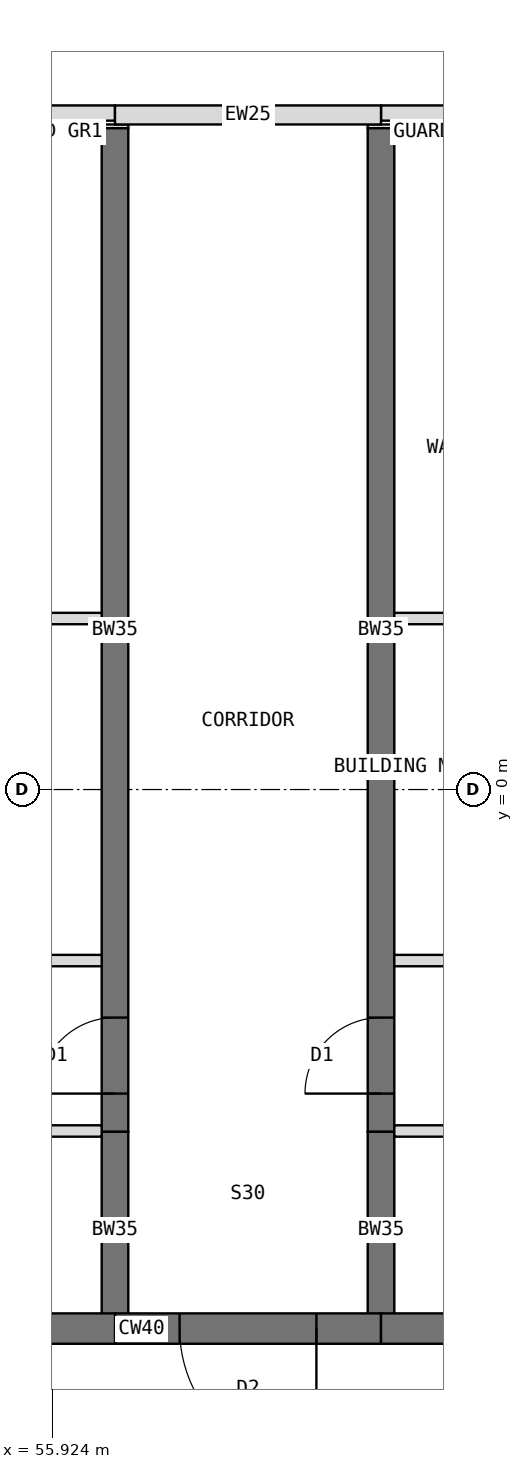
"""IFC4 building model, lengths in metres.
Left out: names, types, materials, properties, quantities, classifications, styles, units other than length and angle.
Written with IfcOpenShell. Run it as: python <this file> out.ifc"""

import sys

from ifc_helpers import new_model, si_unit, direction, frame, frame_2d, origin, place, context, subcontext, project, spatial, rectangle, extrude, element, fill, save


model = new_model("IFC4")
c1 = context("Model", 3, precision=1e-05, world=origin(), true_north=direction((0.0, 1.0)))
c2 = subcontext(c1, "Body", "Model", "MODEL_VIEW")
j1 = project(units=[si_unit("LENGTHUNIT", "METRE"), si_unit("PLANEANGLEUNIT", "RADIAN")], contexts=[c1])
p1 = place(None, origin())
s1 = spatial("IfcSite", under=j1, at=p1, CompositionType="ELEMENT")
p2 = place(p1, origin())
s2 = spatial("IfcBuilding", under=s1, at=p2, CompositionType="ELEMENT")
p3 = place(p2, frame((0.0, 0.0, 291.5)))
s3 = spatial("IfcBuildingStorey", under=s2, at=p3, CompositionType="ELEMENT", Elevation=291.5)
p4 = place(p3, frame((64.798, -7.092, 0.0), z_axis=(0.0, 0.0, 1.0), x_axis=(-1.0, 0.0, 0.0)))
e1 = element("IfcWall", 1, at=p4, inside=s3, PredefinedType="SHEAR", context=c2, shape_type="SweptSolid", body=[
    extrude(rectangle(XDim=4.548, YDim=0.4, at=frame_2d((2.274, 0.0))), origin(), (0.0, 0.0, 1.0), 4.55),
])
p5 = place(p3, frame((60.25, -7.092, 0.0), z_axis=(0.0, 0.0, 1.0), x_axis=(-1.0, 0.0, 0.0)))
e2 = element("IfcWall", 2, at=p5, inside=s3, PredefinedType="SHEAR", context=c2, shape_type="SweptSolid", body=[
    extrude(rectangle(XDim=3.5, YDim=0.4, at=frame_2d((1.75, 0.0))), origin(), (0.0, 0.0, 1.0), 4.55),
])
p6 = place(p5, frame((0.85, 0.0, 0.0)))
e3 = element("IfcOpeningElement", 3, at=p6, cuts=e2, PredefinedType="OPENING", context=c2, shape_type="SweptSolid", body=[
    extrude(rectangle(XDim=1.8, YDim=2.1, at=frame_2d((0.9, 1.05))), frame((0.0, 0.21, 0.0), z_axis=(0.0, -1.0, 0.0), x_axis=(1.0, 0.0, 0.0)), (0.0, 0.0, 1.0), 0.42),
])
p7 = place(p3, frame((56.75, -7.092, 0.0), z_axis=(0.0, 0.0, 1.0), x_axis=(-1.0, 0.0, 0.0)))
e4 = element("IfcWall", 4, at=p7, inside=s3, PredefinedType="SHEAR", context=c2, shape_type="SweptSolid", body=[
    extrude(rectangle(XDim=4.548, YDim=0.4, at=frame_2d((2.274, 0.0))), origin(), (0.0, 0.0, 1.0), 4.55),
])
p8 = place(p3, frame((56.75, -7.092, 0.0), z_axis=(0.0, 0.0, 1.0), x_axis=(0.0, 1.0, 0.0)))
e5 = element("IfcWall", 5, at=p8, inside=s3, PredefinedType="SHEAR", context=c2, shape_type="SweptSolid", body=[
    extrude(rectangle(XDim=2.592, YDim=0.35, at=frame_2d((1.296, 0.0))), origin(), (0.0, 0.0, 1.0), 4.55),
])
p9 = place(p3, frame((56.75, -4.5, 0.0), z_axis=(0.0, 0.0, 1.0), x_axis=(0.0, 1.0, 0.0)))
e6 = element("IfcWall", 6, at=p9, inside=s3, PredefinedType="SHEAR", context=c2, shape_type="SweptSolid", body=[
    extrude(rectangle(XDim=13.2, YDim=0.35, at=frame_2d((6.6, 0.0))), origin(), (0.0, 0.0, 1.0), 4.55),
])
p10 = place(p9, frame((0.5, 0.0, 0.0)))
e7 = element("IfcOpeningElement", 7, at=p10, cuts=e6, PredefinedType="OPENING", context=c2, shape_type="SweptSolid", body=[
    extrude(rectangle(XDim=1.0, YDim=2.1, at=frame_2d((0.5, 1.05))), frame((0.0, 0.185, 0.0), z_axis=(0.0, -1.0, 0.0), x_axis=(1.0, 0.0, 0.0)), (0.0, 0.0, 1.0), 0.37),
])
p11 = place(p3, frame((60.25, -7.092, 0.0), z_axis=(0.0, 0.0, 1.0), x_axis=(0.0, 1.0, 0.0)))
e8 = element("IfcWall", 8, at=p11, inside=s3, PredefinedType="SHEAR", context=c2, shape_type="SweptSolid", body=[
    extrude(rectangle(XDim=2.592, YDim=0.35, at=frame_2d((1.296, 0.0))), origin(), (0.0, 0.0, 1.0), 4.55),
])
p12 = place(p3, frame((60.25, -4.5, 0.0), z_axis=(0.0, 0.0, 1.0), x_axis=(0.0, 1.0, 0.0)))
e9 = element("IfcWall", 9, at=p12, inside=s3, PredefinedType="SHEAR", context=c2, shape_type="SweptSolid", body=[
    extrude(rectangle(XDim=13.2, YDim=0.35, at=frame_2d((6.6, 0.0))), origin(), (0.0, 0.0, 1.0), 4.55),
])
p13 = place(p12, frame((0.5, 0.0, 0.0)))
e10 = element("IfcOpeningElement", 10, at=p13, cuts=e9, PredefinedType="OPENING", context=c2, shape_type="SweptSolid", body=[
    extrude(rectangle(XDim=1.0, YDim=2.1, at=frame_2d((0.5, 1.05))), frame((0.0, 0.185, 0.0), z_axis=(0.0, -1.0, 0.0), x_axis=(1.0, 0.0, 0.0)), (0.0, 0.0, 1.0), 0.37),
])
p14 = place(p3, frame((63.0, 8.9, 0.0), z_axis=(0.0, 0.0, 1.0), x_axis=(-1.0, 0.0, 0.0)))
e11 = element("IfcWall", 11, at=p14, inside=s3, PredefinedType="USERDEFINED", context=c2, shape_type="SweptSolid", body=[
    extrude(rectangle(XDim=2.75, YDim=0.2, at=frame_2d((1.375, 0.0))), origin(), (0.0, 0.0, 1.0), 4.55),
])
p15 = place(p3, frame((60.25, 8.875, 0.0), z_axis=(0.0, 0.0, 1.0), x_axis=(-1.0, 0.0, 0.0)))
e12 = element("IfcWall", 12, at=p15, inside=s3, PredefinedType="STANDARD", context=c2, shape_type="SweptSolid", body=[
    extrude(rectangle(XDim=3.5, YDim=0.25, at=frame_2d((1.75, 0.0))), origin(), (0.0, 0.0, 1.0), 4.55),
])
p16 = place(p3, frame((56.75, 8.9, 0.0), z_axis=(0.0, 0.0, 1.0), x_axis=(-1.0, 0.0, 0.0)))
e13 = element("IfcWall", 13, at=p16, inside=s3, PredefinedType="USERDEFINED", context=c2, shape_type="SweptSolid", body=[
    extrude(rectangle(XDim=2.75, YDim=0.2, at=frame_2d((1.375, 0.0))), origin(), (0.0, 0.0, 1.0), 4.55),
])
for number, where, z_axis, x_axis in (
    (14, (56.75, 8.7, 0.0), (0.0, 0.0, 1.0), (0.0, 1.0, 0.0)),
    (15, (60.25, 8.7, 0.0), (0.0, 0.0, 1.0), (0.0, 1.0, 0.0)),
):
    element("IfcWall", number, at=place(p3, frame(where, z_axis=z_axis, x_axis=x_axis)), inside=s3, PredefinedType="PARTITIONING", context=c2, shape_type="SweptSolid", body=[
        extrude(rectangle(XDim=0.05, YDim=0.35, at=frame_2d((0.025, 0.0))), origin(), (0.0, 0.0, 1.0), 4.55),
    ])
p17 = place(p3, frame((56.575, -2.25, 0.0), z_axis=(0.0, 0.0, 1.0), x_axis=(-1.0, 0.0, 0.0)))
e16 = element("IfcWall", 16, at=p17, inside=s3, PredefinedType="PARTITIONING", context=c2, shape_type="SweptSolid", body=[
    extrude(rectangle(XDim=4.825, YDim=0.15, at=frame_2d((2.413, 0.0))), origin(), (0.0, 0.0, 1.0), 4.55),
])
p18 = place(p17, frame((3.425, 0.0, 0.0)))
e17 = element("IfcOpeningElement", 17, at=p18, cuts=e16, PredefinedType="OPENING", context=c2, shape_type="SweptSolid", body=[
    extrude(rectangle(XDim=1.0, YDim=2.1, at=frame_2d((0.5, 1.05))), frame((0.0, 0.085, 0.0), z_axis=(0.0, -1.0, 0.0), x_axis=(1.0, 0.0, 0.0)), (0.0, 0.0, 1.0), 0.17),
])
p19 = place(p3, frame((56.575, 2.25, 0.0), z_axis=(0.0, 0.0, 1.0), x_axis=(-1.0, 0.0, 0.0)))
e18 = element("IfcWall", 18, at=p19, inside=s3, PredefinedType="PARTITIONING", context=c2, shape_type="SweptSolid", body=[
    extrude(rectangle(XDim=4.825, YDim=0.15, at=frame_2d((2.413, 0.0))), origin(), (0.0, 0.0, 1.0), 4.55),
])
p20 = place(p19, frame((3.425, 0.0, 0.0)))
e19 = element("IfcOpeningElement", 19, at=p20, cuts=e18, PredefinedType="OPENING", context=c2, shape_type="SweptSolid", body=[
    extrude(rectangle(XDim=1.0, YDim=2.1, at=frame_2d((0.5, 1.05))), frame((0.0, 0.085, 0.0), z_axis=(0.0, -1.0, 0.0), x_axis=(1.0, 0.0, 0.0)), (0.0, 0.0, 1.0), 0.17),
])
p21 = place(p3, frame((56.575, -4.492, 0.0), z_axis=(0.0, 0.0, 1.0), x_axis=(-1.0, 0.0, 0.0)))
e20 = element("IfcWall", 20, at=p21, inside=s3, PredefinedType="PARTITIONING", context=c2, shape_type="SweptSolid", body=[
    extrude(rectangle(XDim=2.4, YDim=0.15, at=frame_2d((1.2, 0.0))), origin(), (0.0, 0.0, 1.0), 4.017),
])
p22 = place(p3, frame((60.425, -2.25, 0.0), z_axis=(0.0, 0.0, 1.0), x_axis=(1.0, 0.0, 0.0)))
e21 = element("IfcWall", 21, at=p22, inside=s3, PredefinedType="PARTITIONING", context=c2, shape_type="SweptSolid", body=[
    extrude(rectangle(XDim=4.825, YDim=0.15, at=frame_2d((2.413, 0.0))), origin(), (0.0, 0.0, 1.0), 4.55),
])
p23 = place(p22, frame((3.425, 0.0, 0.0)))
e22 = element("IfcOpeningElement", 22, at=p23, cuts=e21, PredefinedType="OPENING", context=c2, shape_type="SweptSolid", body=[
    extrude(rectangle(XDim=1.0, YDim=2.1, at=frame_2d((0.5, 1.05))), frame((0.0, 0.085, 0.0), z_axis=(0.0, -1.0, 0.0), x_axis=(1.0, 0.0, 0.0)), (0.0, 0.0, 1.0), 0.17),
])
p24 = place(p3, frame((60.425, 2.25, 0.0), z_axis=(0.0, 0.0, 1.0), x_axis=(1.0, 0.0, 0.0)))
e23 = element("IfcWall", 23, at=p24, inside=s3, PredefinedType="PARTITIONING", context=c2, shape_type="SweptSolid", body=[
    extrude(rectangle(XDim=4.825, YDim=0.15, at=frame_2d((2.413, 0.0))), origin(), (0.0, 0.0, 1.0), 4.55),
])
p25 = place(p24, frame((3.425, 0.0, 0.0)))
e24 = element("IfcOpeningElement", 24, at=p25, cuts=e23, PredefinedType="OPENING", context=c2, shape_type="SweptSolid", body=[
    extrude(rectangle(XDim=1.0, YDim=2.1, at=frame_2d((0.5, 1.05))), frame((0.0, 0.085, 0.0), z_axis=(0.0, -1.0, 0.0), x_axis=(1.0, 0.0, 0.0)), (0.0, 0.0, 1.0), 0.17),
])
p26 = place(p3, frame((60.425, -4.492, 0.0), z_axis=(0.0, 0.0, 1.0), x_axis=(1.0, 0.0, 0.0)))
e25 = element("IfcWall", 25, at=p26, inside=s3, PredefinedType="PARTITIONING", context=c2, shape_type="SweptSolid", body=[
    extrude(rectangle(XDim=2.4, YDim=0.15, at=frame_2d((1.2, 0.0))), origin(), (0.0, 0.0, 1.0), 4.017),
])
p27 = place(p6, origin())
e26 = element("IfcDoor", 26, at=p27, inside=s3, OperationType="DOUBLE_DOOR_DOUBLE_SWING", PredefinedType="DOOR", context=c2, shape_type="SweptSolid", body=[
    extrude(rectangle(XDim=1.8, YDim=2.1, at=frame_2d((0.9, 1.05))), frame((0.0, 0.025, 0.0), z_axis=(0.0, -1.0, 0.0), x_axis=(1.0, 0.0, 0.0)), (0.0, 0.0, 1.0), 0.05),
])
fill(e3, e26)
p28 = place(p10, origin())
e27 = element("IfcDoor", 27, at=p28, inside=s3, OperationType="SINGLE_SWING_LEFT", PredefinedType="DOOR", context=c2, shape_type="SweptSolid", body=[
    extrude(rectangle(XDim=1.0, YDim=2.1, at=frame_2d((0.5, 1.05))), frame((0.0, 0.025, 0.0), z_axis=(0.0, -1.0, 0.0), x_axis=(1.0, 0.0, 0.0)), (0.0, 0.0, 1.0), 0.05),
])
fill(e7, e27)
p29 = place(p13, origin())
e28 = element("IfcDoor", 28, at=p29, inside=s3, OperationType="SINGLE_SWING_LEFT", PredefinedType="DOOR", context=c2, shape_type="SweptSolid", body=[
    extrude(rectangle(XDim=1.0, YDim=2.1, at=frame_2d((0.5, 1.05))), frame((0.0, 0.025, 0.0), z_axis=(0.0, -1.0, 0.0), x_axis=(1.0, 0.0, 0.0)), (0.0, 0.0, 1.0), 0.05),
])
fill(e10, e28)
save(model, sys.argv[1])
